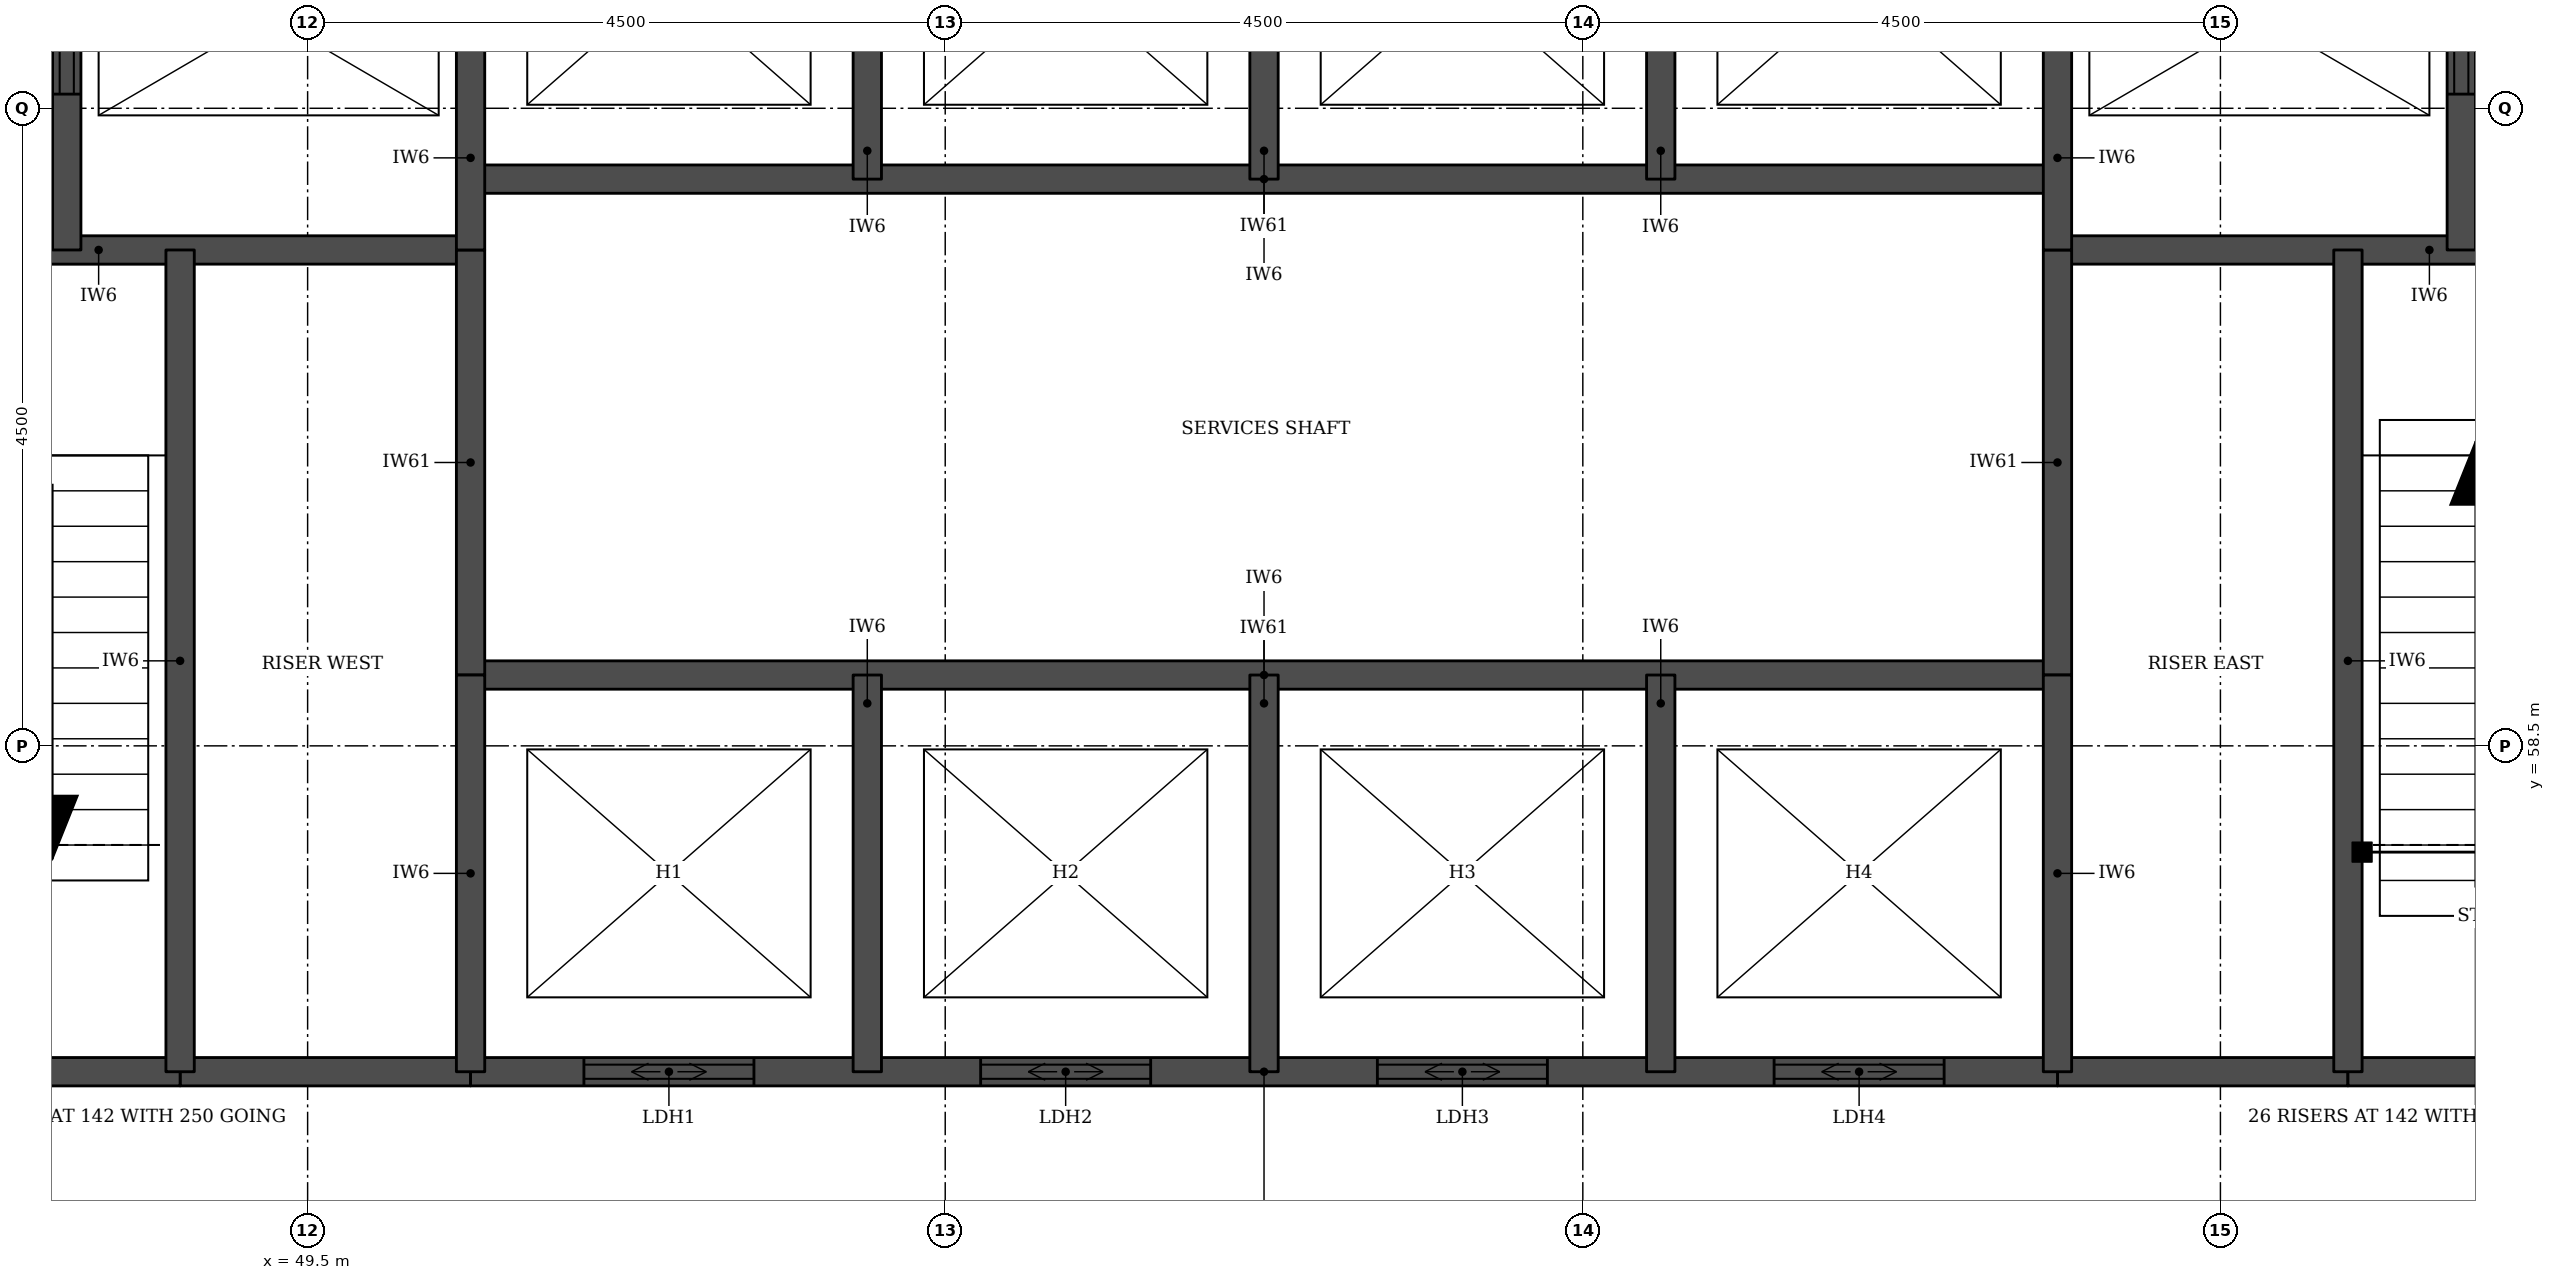
"""IFC4 building model, lengths in metres.
Left out: names, types, materials, properties, quantities, classifications, styles, units other than length and angle.
Written with IfcOpenShell. Run it as: python <this file> out.ifc"""

import sys

from ifc_helpers import new_model, si_unit, direction, frame, frame_2d, origin, place, context, subcontext, project, spatial, rectangle, extrude, element, fill, save


model = new_model("IFC4")
c1 = context("Model", 3, precision=1e-05, world=origin(), true_north=direction((0.0, 1.0)))
c2 = subcontext(c1, "Body", "Model", "MODEL_VIEW")
j1 = project(units=[si_unit("LENGTHUNIT", "METRE"), si_unit("PLANEANGLEUNIT", "RADIAN")], contexts=[c1])
p1 = place(None, origin())
s1 = spatial("IfcSite", under=j1, at=p1, CompositionType="ELEMENT")
p2 = place(p1, origin())
s2 = spatial("IfcBuilding", under=s1, at=p2, CompositionType="ELEMENT")
p3 = place(p2, frame((0.0, 0.0, 181.0)))
s3 = spatial("IfcBuildingStorey", under=s2, at=p3, CompositionType="ELEMENT", Elevation=181.0)
for number, where, z_axis, x_axis in (
    (1, (48.6, 56.2, 0.0), (0.0, 0.0, 1.0), (1.0, 0.0, 0.0)),
    (2, (61.85, 56.2, 0.0), (0.0, 0.0, 1.0), (1.0, 0.0, 0.0)),
):
    element("IfcWall", number, at=place(p3, frame(where, z_axis=z_axis, x_axis=x_axis)), inside=s3, PredefinedType="SOLIDWALL", context=c2, shape_type="SweptSolid", body=[
        extrude(rectangle(XDim=2.05, YDim=0.2, at=frame_2d((1.025, 0.0))), origin(), (0.0, 0.0, 1.0), 3.55),
    ])
p4 = place(p3, frame((45.4, 56.2, 0.0), z_axis=(0.0, 0.0, 1.0), x_axis=(1.0, 0.0, 0.0)))
e3 = element("IfcWall", 3, at=p4, inside=s3, PredefinedType="SOLIDWALL", context=c2, shape_type="SweptSolid", body=[
    extrude(rectangle(XDim=3.2, YDim=0.2, at=frame_2d((1.6, 0.0))), origin(), (0.0, 0.0, 1.0), 3.55),
])
p5 = place(p3, frame((50.65, 56.2, 0.0), z_axis=(0.0, 0.0, 1.0), x_axis=(1.0, 0.0, 0.0)))
e4 = element("IfcWall", 4, at=p5, inside=s3, PredefinedType="SOLIDWALL", context=c2, shape_type="SweptSolid", body=[
    extrude(rectangle(XDim=11.2, YDim=0.2, at=frame_2d((5.6, 0.0))), origin(), (0.0, 0.0, 1.0), 3.55),
])
p6 = place(p5, frame((0.8, 0.0, 0.0)))
e5 = element("IfcOpeningElement", 5, at=p6, cuts=e4, PredefinedType="OPENING", context=c2, shape_type="SweptSolid", body=[
    extrude(rectangle(XDim=1.2, YDim=2.1, at=frame_2d((0.6, 1.05))), frame((0.0, 0.11, 0.0), z_axis=(0.0, -1.0, 0.0), x_axis=(1.0, 0.0, 0.0)), (0.0, 0.0, 1.0), 0.22),
])
p7 = place(p5, frame((3.6, 0.0, 0.0)))
e6 = element("IfcOpeningElement", 6, at=p7, cuts=e4, PredefinedType="OPENING", context=c2, shape_type="SweptSolid", body=[
    extrude(rectangle(XDim=1.2, YDim=2.1, at=frame_2d((0.6, 1.05))), frame((0.0, 0.11, 0.0), z_axis=(0.0, -1.0, 0.0), x_axis=(1.0, 0.0, 0.0)), (0.0, 0.0, 1.0), 0.22),
])
p8 = place(p5, frame((6.4, 0.0, 0.0)))
e7 = element("IfcOpeningElement", 7, at=p8, cuts=e4, PredefinedType="OPENING", context=c2, shape_type="SweptSolid", body=[
    extrude(rectangle(XDim=1.2, YDim=2.1, at=frame_2d((0.6, 1.05))), frame((0.0, 0.11, 0.0), z_axis=(0.0, -1.0, 0.0), x_axis=(1.0, 0.0, 0.0)), (0.0, 0.0, 1.0), 0.22),
])
p9 = place(p5, frame((9.2, 0.0, 0.0)))
e8 = element("IfcOpeningElement", 8, at=p9, cuts=e4, PredefinedType="OPENING", context=c2, shape_type="SweptSolid", body=[
    extrude(rectangle(XDim=1.2, YDim=2.1, at=frame_2d((0.6, 1.05))), frame((0.0, 0.11, 0.0), z_axis=(0.0, -1.0, 0.0), x_axis=(1.0, 0.0, 0.0)), (0.0, 0.0, 1.0), 0.22),
])
p10 = place(p3, frame((63.9, 56.2, 0.0), z_axis=(0.0, 0.0, 1.0), x_axis=(1.0, 0.0, 0.0)))
e9 = element("IfcWall", 9, at=p10, inside=s3, PredefinedType="SOLIDWALL", context=c2, shape_type="SweptSolid", body=[
    extrude(rectangle(XDim=3.2, YDim=0.2, at=frame_2d((1.6, 0.0))), origin(), (0.0, 0.0, 1.0), 3.55),
])
p11 = place(p3, frame((50.65, 59.0, 0.0), z_axis=(0.0, 0.0, 1.0), x_axis=(1.0, 0.0, 0.0)))
e10 = element("IfcWall", 10, at=p11, inside=s3, PredefinedType="SOLIDWALL", context=c2, shape_type="SweptSolid", body=[
    extrude(rectangle(XDim=11.2, YDim=0.2, at=frame_2d((5.6, 0.0))), origin(), (0.0, 0.0, 1.0), 3.7),
])
for number, where, z_axis, x_axis in (
    (11, (45.4, 62.0, 0.0), (0.0, 0.0, 1.0), (1.0, 0.0, 0.0)),
    (12, (61.85, 62.0, 0.0), (0.0, 0.0, 1.0), (1.0, 0.0, 0.0)),
):
    element("IfcWall", number, at=place(p3, frame(where, z_axis=z_axis, x_axis=x_axis)), inside=s3, PredefinedType="SOLIDWALL", context=c2, shape_type="SweptSolid", body=[
        extrude(rectangle(XDim=5.25, YDim=0.2, at=frame_2d((2.625, 0.0))), origin(), (0.0, 0.0, 1.0), 3.55),
    ])
p12 = place(p3, frame((50.65, 62.5, 0.0), z_axis=(0.0, 0.0, 1.0), x_axis=(1.0, 0.0, 0.0)))
e13 = element("IfcWall", 13, at=p12, inside=s3, PredefinedType="SOLIDWALL", context=c2, shape_type="SweptSolid", body=[
    extrude(rectangle(XDim=11.2, YDim=0.2, at=frame_2d((5.6, 0.0))), origin(), (0.0, 0.0, 1.0), 3.7),
])
p13 = place(p3, frame((47.8, 62.0, 0.0), z_axis=(0.0, 0.0, 1.0), x_axis=(0.0, 1.0, 0.0)))
e14 = element("IfcWall", 14, at=p13, inside=s3, PredefinedType="SOLIDWALL", context=c2, shape_type="SweptSolid", body=[
    extrude(rectangle(XDim=3.3, YDim=0.2, at=frame_2d((1.65, 0.0))), origin(), (0.0, 0.0, 1.0), 3.55),
])
p14 = place(p13, frame((1.1, 0.0, 0.0)))
e15 = element("IfcOpeningElement", 15, at=p14, cuts=e14, PredefinedType="OPENING", context=c2, shape_type="SweptSolid", body=[
    extrude(rectangle(XDim=1.1, YDim=2.1, at=frame_2d((0.55, 1.05))), frame((0.0, 0.11, 0.0), z_axis=(0.0, -1.0, 0.0), x_axis=(1.0, 0.0, 0.0)), (0.0, 0.0, 1.0), 0.22),
])
p15 = place(p3, frame((48.6, 56.2, 0.0), z_axis=(0.0, 0.0, 1.0), x_axis=(0.0, 1.0, 0.0)))
e16 = element("IfcWall", 16, at=p15, inside=s3, PredefinedType="SOLIDWALL", context=c2, shape_type="SweptSolid", body=[
    extrude(rectangle(XDim=5.8, YDim=0.2, at=frame_2d((2.9, 0.0))), origin(), (0.0, 0.0, 1.0), 3.55),
])
p16 = place(p3, frame((50.65, 59.0, 0.0), z_axis=(0.0, 0.0, 1.0), x_axis=(0.0, 1.0, 0.0)))
e17 = element("IfcWall", 17, at=p16, inside=s3, PredefinedType="SOLIDWALL", context=c2, shape_type="SweptSolid", body=[
    extrude(rectangle(XDim=3.0, YDim=0.2, at=frame_2d((1.5, 0.0))), origin(), (0.0, 0.0, 1.0), 3.7),
])
p17 = place(p3, frame((50.65, 56.2, 0.0), z_axis=(0.0, 0.0, 1.0), x_axis=(0.0, 1.0, 0.0)))
e18 = element("IfcWall", 18, at=p17, inside=s3, PredefinedType="SOLIDWALL", context=c2, shape_type="SweptSolid", body=[
    extrude(rectangle(XDim=2.8, YDim=0.2, at=frame_2d((1.4, 0.0))), origin(), (0.0, 0.0, 1.0), 3.55),
])
p18 = place(p3, frame((50.65, 62.0, 0.0), z_axis=(0.0, 0.0, 1.0), x_axis=(0.0, 1.0, 0.0)))
e19 = element("IfcWall", 19, at=p18, inside=s3, PredefinedType="SOLIDWALL", context=c2, shape_type="SweptSolid", body=[
    extrude(rectangle(XDim=3.3, YDim=0.2, at=frame_2d((1.65, 0.0))), origin(), (0.0, 0.0, 1.0), 3.55),
])
for number, where, z_axis, x_axis in (
    (20, (53.45, 56.2, 0.0), (0.0, 0.0, 1.0), (0.0, 1.0, 0.0)),
    (21, (53.45, 62.5, 0.0), (0.0, 0.0, 1.0), (0.0, 1.0, 0.0)),
    (22, (56.25, 56.2, 0.0), (0.0, 0.0, 1.0), (0.0, 1.0, 0.0)),
    (23, (56.25, 62.5, 0.0), (0.0, 0.0, 1.0), (0.0, 1.0, 0.0)),
    (24, (59.05, 56.2, 0.0), (0.0, 0.0, 1.0), (0.0, 1.0, 0.0)),
    (25, (59.05, 62.5, 0.0), (0.0, 0.0, 1.0), (0.0, 1.0, 0.0)),
):
    element("IfcWall", number, at=place(p3, frame(where, z_axis=z_axis, x_axis=x_axis)), inside=s3, PredefinedType="SOLIDWALL", context=c2, shape_type="SweptSolid", body=[
        extrude(rectangle(XDim=2.8, YDim=0.2, at=frame_2d((1.4, 0.0))), origin(), (0.0, 0.0, 1.0), 3.55),
    ])
p19 = place(p3, frame((61.85, 59.0, 0.0), z_axis=(0.0, 0.0, 1.0), x_axis=(0.0, 1.0, 0.0)))
e26 = element("IfcWall", 26, at=p19, inside=s3, PredefinedType="SOLIDWALL", context=c2, shape_type="SweptSolid", body=[
    extrude(rectangle(XDim=3.0, YDim=0.2, at=frame_2d((1.5, 0.0))), origin(), (0.0, 0.0, 1.0), 3.7),
])
p20 = place(p3, frame((61.85, 56.2, 0.0), z_axis=(0.0, 0.0, 1.0), x_axis=(0.0, 1.0, 0.0)))
e27 = element("IfcWall", 27, at=p20, inside=s3, PredefinedType="SOLIDWALL", context=c2, shape_type="SweptSolid", body=[
    extrude(rectangle(XDim=2.8, YDim=0.2, at=frame_2d((1.4, 0.0))), origin(), (0.0, 0.0, 1.0), 3.55),
])
p21 = place(p3, frame((61.85, 62.0, 0.0), z_axis=(0.0, 0.0, 1.0), x_axis=(0.0, 1.0, 0.0)))
e28 = element("IfcWall", 28, at=p21, inside=s3, PredefinedType="SOLIDWALL", context=c2, shape_type="SweptSolid", body=[
    extrude(rectangle(XDim=3.3, YDim=0.2, at=frame_2d((1.65, 0.0))), origin(), (0.0, 0.0, 1.0), 3.55),
])
p22 = place(p3, frame((63.9, 56.2, 0.0), z_axis=(0.0, 0.0, 1.0), x_axis=(0.0, 1.0, 0.0)))
e29 = element("IfcWall", 29, at=p22, inside=s3, PredefinedType="SOLIDWALL", context=c2, shape_type="SweptSolid", body=[
    extrude(rectangle(XDim=5.8, YDim=0.2, at=frame_2d((2.9, 0.0))), origin(), (0.0, 0.0, 1.0), 3.55),
])
p23 = place(p3, frame((64.7, 62.0, 0.0), z_axis=(0.0, 0.0, 1.0), x_axis=(0.0, 1.0, 0.0)))
e30 = element("IfcWall", 30, at=p23, inside=s3, PredefinedType="SOLIDWALL", context=c2, shape_type="SweptSolid", body=[
    extrude(rectangle(XDim=3.3, YDim=0.2, at=frame_2d((1.65, 0.0))), origin(), (0.0, 0.0, 1.0), 3.55),
])
p24 = place(p23, frame((1.1, 0.0, 0.0)))
e31 = element("IfcOpeningElement", 31, at=p24, cuts=e30, PredefinedType="OPENING", context=c2, shape_type="SweptSolid", body=[
    extrude(rectangle(XDim=1.1, YDim=2.1, at=frame_2d((0.55, 1.05))), frame((0.0, 0.11, 0.0), z_axis=(0.0, -1.0, 0.0), x_axis=(1.0, 0.0, 0.0)), (0.0, 0.0, 1.0), 0.22),
])
p25 = place(p6, origin())
e32 = element("IfcDoor", 32, at=p25, inside=s3, OperationType="DOUBLE_DOOR_SLIDING", PredefinedType="DOOR", context=c2, shape_type="SweptSolid", body=[
    extrude(rectangle(XDim=1.2, YDim=2.1, at=frame_2d((0.6, 1.05))), frame((0.0, 0.025, 0.0), z_axis=(0.0, -1.0, 0.0), x_axis=(1.0, 0.0, 0.0)), (0.0, 0.0, 1.0), 0.05),
])
fill(e5, e32)
p26 = place(p7, origin())
e33 = element("IfcDoor", 33, at=p26, inside=s3, OperationType="DOUBLE_DOOR_SLIDING", PredefinedType="DOOR", context=c2, shape_type="SweptSolid", body=[
    extrude(rectangle(XDim=1.2, YDim=2.1, at=frame_2d((0.6, 1.05))), frame((0.0, 0.025, 0.0), z_axis=(0.0, -1.0, 0.0), x_axis=(1.0, 0.0, 0.0)), (0.0, 0.0, 1.0), 0.05),
])
fill(e6, e33)
p27 = place(p8, origin())
e34 = element("IfcDoor", 34, at=p27, inside=s3, OperationType="DOUBLE_DOOR_SLIDING", PredefinedType="DOOR", context=c2, shape_type="SweptSolid", body=[
    extrude(rectangle(XDim=1.2, YDim=2.1, at=frame_2d((0.6, 1.05))), frame((0.0, 0.025, 0.0), z_axis=(0.0, -1.0, 0.0), x_axis=(1.0, 0.0, 0.0)), (0.0, 0.0, 1.0), 0.05),
])
fill(e7, e34)
p28 = place(p9, origin())
e35 = element("IfcDoor", 35, at=p28, inside=s3, OperationType="DOUBLE_DOOR_SLIDING", PredefinedType="DOOR", context=c2, shape_type="SweptSolid", body=[
    extrude(rectangle(XDim=1.2, YDim=2.1, at=frame_2d((0.6, 1.05))), frame((0.0, 0.025, 0.0), z_axis=(0.0, -1.0, 0.0), x_axis=(1.0, 0.0, 0.0)), (0.0, 0.0, 1.0), 0.05),
])
fill(e8, e35)
p29 = place(p14, origin())
e36 = element("IfcDoor", 36, at=p29, inside=s3, OperationType="DOUBLE_DOOR_SLIDING", PredefinedType="DOOR", context=c2, shape_type="SweptSolid", body=[
    extrude(rectangle(XDim=1.1, YDim=2.1, at=frame_2d((0.55, 1.05))), frame((0.0, 0.025, 0.0), z_axis=(0.0, -1.0, 0.0), x_axis=(1.0, 0.0, 0.0)), (0.0, 0.0, 1.0), 0.05),
])
fill(e15, e36)
p30 = place(p24, origin())
e37 = element("IfcDoor", 37, at=p30, inside=s3, OperationType="DOUBLE_DOOR_SLIDING", PredefinedType="DOOR", context=c2, shape_type="SweptSolid", body=[
    extrude(rectangle(XDim=1.1, YDim=2.1, at=frame_2d((0.55, 1.05))), frame((0.0, 0.025, 0.0), z_axis=(0.0, -1.0, 0.0), x_axis=(1.0, 0.0, 0.0)), (0.0, 0.0, 1.0), 0.05),
])
fill(e31, e37)
save(model, sys.argv[1])
